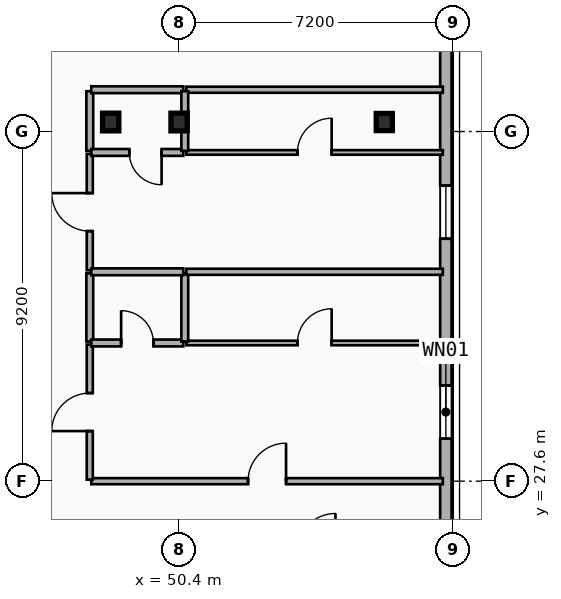
"""IFC4 building model, lengths in metres.
Left out: names, types, materials, properties, quantities, classifications, styles, units other than length and angle.
Written with IfcOpenShell. Run it as: python <this file> out.ifc"""

import sys

from ifc_helpers import new_model, si_unit, direction, frame, frame_2d, origin, origin_2d, place, context, subcontext, project, spatial, rectangle, i_section, extrude, element, fill, save


model = new_model("IFC4")
c1 = context("Model", 3, precision=1e-05, world=origin(), true_north=direction((0.0, 1.0)))
c2 = subcontext(c1, "Body", "Model", "MODEL_VIEW")
j1 = project(units=[si_unit("LENGTHUNIT", "METRE"), si_unit("PLANEANGLEUNIT", "RADIAN")], contexts=[c1])
p1 = place(None, origin())
s1 = spatial("IfcSite", under=j1, at=p1, CompositionType="ELEMENT")
p2 = place(p1, origin())
s2 = spatial("IfcBuilding", under=s1, at=p2, CompositionType="ELEMENT")
p3 = place(p2, frame((0.0, 0.0, 32.5)))
s3 = spatial("IfcBuildingStorey", under=s2, at=p3, CompositionType="ELEMENT", Elevation=32.5)
for number, where, z_axis, x_axis in (
    (1, (48.6, 37.05, 0.0), (0.0, 0.0, 1.0), (1.0, 0.0, 0.0)),
    (2, (50.4, 37.05, 0.0), (0.0, 0.0, 1.0), (1.0, 0.0, 0.0)),
):
    element("IfcColumn", number, at=place(p3, frame(where, z_axis=z_axis, x_axis=x_axis)), inside=s3, PredefinedType="COLUMN", context=c2, shape_type="SweptSolid", body=[
        extrude(i_section(OverallWidth=0.428, OverallDepth=0.465, WebThickness=0.045, FlangeThickness=0.073, FilletRadius=0.015, at=origin_2d()), origin(), (0.0, 0.0, 1.0), 3.5),
    ])
p4 = place(p3, frame((55.8, 37.05, 0.0), z_axis=(0.0, 0.0, 1.0), x_axis=(1.0, 0.0, 0.0)))
e3 = element("IfcColumn", 3, at=p4, inside=s3, PredefinedType="COLUMN", context=c2, shape_type="SweptSolid", body=[
    extrude(i_section(OverallWidth=0.424, OverallDepth=0.45, WebThickness=0.041, FlangeThickness=0.065, FilletRadius=0.015, at=origin_2d()), origin(), (0.0, 0.0, 1.0), 3.5),
])
p5 = place(p3, frame((57.42, 41.0, 0.0), z_axis=(0.0, 0.0, 1.0), x_axis=(0.0, -1.0, 0.0)))
e4 = element("IfcWall", 4, at=p5, inside=s3, PredefinedType="SOLIDWALL", context=c2, shape_type="SweptSolid", body=[
    extrude(rectangle(XDim=15.2, YDim=0.3, at=frame_2d((7.6, 0.0))), origin(), (0.0, 0.0, 1.0), 3.24),
])
p6 = place(p5, frame((10.882, 0.0, 0.48)))
e5 = element("IfcOpeningElement", 5, at=p6, cuts=e4, PredefinedType="OPENING", context=c2, shape_type="SweptSolid", body=[
    extrude(rectangle(XDim=1.4, YDim=1.8, at=frame_2d((0.7, 0.9))), frame((0.0, 0.16, 0.0), z_axis=(0.0, -1.0, 0.0), x_axis=(1.0, 0.0, 0.0)), (0.0, 0.0, 1.0), 0.32),
])
p7 = place(p5, frame((5.621, 0.0, 0.48)))
e6 = element("IfcOpeningElement", 6, at=p7, cuts=e4, PredefinedType="OPENING", context=c2, shape_type="SweptSolid", body=[
    extrude(rectangle(XDim=1.4, YDim=1.8, at=frame_2d((0.7, 0.9))), frame((0.0, 0.16, 0.0), z_axis=(0.0, -1.0, 0.0), x_axis=(1.0, 0.0, 0.0)), (0.0, 0.0, 1.0), 0.32),
])
p8 = place(p3, frame((48.09, 27.6, 0.0), z_axis=(0.0, 0.0, 1.0), x_axis=(1.0, 0.0, 0.0)))
e7 = element("IfcWall", 7, at=p8, inside=s3, PredefinedType="PARTITIONING", context=c2, shape_type="SweptSolid", body=[
    extrude(rectangle(XDim=9.25, YDim=0.16, at=frame_2d((4.625, 0.0))), origin(), (0.0, 0.0, 1.0), 2.57),
])
p9 = place(p8, frame((4.125, 0.0, 0.0)))
e8 = element("IfcOpeningElement", 8, at=p9, cuts=e7, PredefinedType="OPENING", context=c2, shape_type="SweptSolid", body=[
    extrude(rectangle(XDim=1.0, YDim=2.15, at=frame_2d((0.5, 1.075))), frame((0.0, 0.09, 0.0), z_axis=(0.0, -1.0, 0.0), x_axis=(1.0, 0.0, 0.0)), (0.0, 0.0, 1.0), 0.18),
])
p10 = place(p3, frame((48.05, 27.64, 0.0), z_axis=(0.0, 0.0, 1.0), x_axis=(0.0, 1.0, 0.0)))
e9 = element("IfcWall", 9, at=p10, inside=s3, PredefinedType="PARTITIONING", context=c2, shape_type="SweptSolid", body=[
    extrude(rectangle(XDim=3.556, YDim=0.16, at=frame_2d((1.778, 0.0))), origin(), (0.0, 0.0, 1.0), 3.24),
])
p11 = place(p10, frame((1.278, 0.0, 0.0)))
e10 = element("IfcOpeningElement", 10, at=p11, cuts=e9, PredefinedType="OPENING", context=c2, shape_type="SweptSolid", body=[
    extrude(rectangle(XDim=1.0, YDim=2.15, at=frame_2d((0.5, 1.075))), frame((0.0, 0.09, 0.0), z_axis=(0.0, -1.0, 0.0), x_axis=(1.0, 0.0, 0.0)), (0.0, 0.0, 1.0), 0.18),
])
p12 = place(p3, frame((48.05, 31.276, 0.0), z_axis=(0.0, 0.0, 1.0), x_axis=(0.0, 1.0, 0.0)))
e11 = element("IfcWall", 11, at=p12, inside=s3, PredefinedType="PLUMBINGWALL", context=c2, shape_type="SweptSolid", body=[
    extrude(rectangle(XDim=1.793, YDim=0.18, at=frame_2d((0.896, 0.0))), origin(), (0.0, 0.0, 1.0), 3.24),
])
p13 = place(p3, frame((48.05, 33.149, 0.0), z_axis=(0.0, 0.0, 1.0), x_axis=(0.0, 1.0, 0.0)))
e12 = element("IfcWall", 12, at=p13, inside=s3, PredefinedType="PARTITIONING", context=c2, shape_type="SweptSolid", body=[
    extrude(rectangle(XDim=3.061, YDim=0.16, at=frame_2d((1.531, 0.0))), origin(), (0.0, 0.0, 1.0), 3.24),
])
p14 = place(p13, frame((1.031, 0.0, 0.0)))
e13 = element("IfcOpeningElement", 13, at=p14, cuts=e12, PredefinedType="OPENING", context=c2, shape_type="SweptSolid", body=[
    extrude(rectangle(XDim=1.0, YDim=2.15, at=frame_2d((0.5, 1.075))), frame((0.0, 0.09, 0.0), z_axis=(0.0, -1.0, 0.0), x_axis=(1.0, 0.0, 0.0)), (0.0, 0.0, 1.0), 0.18),
])
p15 = place(p3, frame((48.05, 36.29, 0.0), z_axis=(0.0, 0.0, 1.0), x_axis=(0.0, 1.0, 0.0)))
e14 = element("IfcWall", 14, at=p15, inside=s3, PredefinedType="PLUMBINGWALL", context=c2, shape_type="SweptSolid", body=[
    extrude(rectangle(XDim=1.57, YDim=0.18, at=frame_2d((0.785, 0.0))), origin(), (0.0, 0.0, 1.0), 2.72),
])
p16 = place(p3, frame((48.09, 37.9, 0.0), z_axis=(0.0, 0.0, 1.0), x_axis=(1.0, 0.0, 0.0)))
e15 = element("IfcWall", 15, at=p16, inside=s3, PredefinedType="PLUMBINGWALL", context=c2, shape_type="SweptSolid", body=[
    extrude(rectangle(XDim=2.42, YDim=0.18, at=frame_2d((1.21, 0.0))), origin(), (0.0, 0.0, 1.0), 3.24),
])
p17 = place(p3, frame((50.59, 37.9, 0.0), z_axis=(0.0, 0.0, 1.0), x_axis=(1.0, 0.0, 0.0)))
e16 = element("IfcWall", 16, at=p17, inside=s3, PredefinedType="PARTITIONING", context=c2, shape_type="SweptSolid", body=[
    extrude(rectangle(XDim=6.75, YDim=0.16, at=frame_2d((3.375, 0.0))), origin(), (0.0, 0.0, 1.0), 3.24),
])
p18 = place(p3, frame((48.09, 31.236, 0.0), z_axis=(0.0, 0.0, 1.0), x_axis=(1.0, 0.0, 0.0)))
e17 = element("IfcWall", 17, at=p18, inside=s3, PredefinedType="PLUMBINGWALL", context=c2, shape_type="SweptSolid", body=[
    extrude(rectangle(XDim=2.42, YDim=0.18, at=frame_2d((1.21, 0.0))), origin(), (0.0, 0.0, 1.0), 2.57),
])
p19 = place(p18, frame((0.785, 0.0, 0.0)))
e18 = element("IfcOpeningElement", 18, at=p19, cuts=e17, PredefinedType="OPENING", context=c2, shape_type="SweptSolid", body=[
    extrude(rectangle(XDim=0.85, YDim=2.1, at=frame_2d((0.425, 1.05))), frame((0.0, 0.1, 0.0), z_axis=(0.0, -1.0, 0.0), x_axis=(1.0, 0.0, 0.0)), (0.0, 0.0, 1.0), 0.2),
])
p20 = place(p3, frame((50.59, 31.236, 0.0), z_axis=(0.0, 0.0, 1.0), x_axis=(1.0, 0.0, 0.0)))
e19 = element("IfcWall", 19, at=p20, inside=s3, PredefinedType="PARTITIONING", context=c2, shape_type="SweptSolid", body=[
    extrude(rectangle(XDim=6.75, YDim=0.12, at=frame_2d((3.375, 0.0))), origin(), (0.0, 0.0, 1.0), 2.57),
])
p21 = place(p20, frame((2.925, 0.0, 0.0)))
e20 = element("IfcOpeningElement", 20, at=p21, cuts=e19, PredefinedType="OPENING", context=c2, shape_type="SweptSolid", body=[
    extrude(rectangle(XDim=0.9, YDim=2.1, at=frame_2d((0.45, 1.05))), frame((0.0, 0.07, 0.0), z_axis=(0.0, -1.0, 0.0), x_axis=(1.0, 0.0, 0.0)), (0.0, 0.0, 1.0), 0.14),
])
p22 = place(p3, frame((50.55, 31.276, 0.0), z_axis=(0.0, 0.0, 1.0), x_axis=(0.0, 1.0, 0.0)))
e21 = element("IfcWall", 21, at=p22, inside=s3, PredefinedType="PLUMBINGWALL", context=c2, shape_type="SweptSolid", body=[
    extrude(rectangle(XDim=1.793, YDim=0.18, at=frame_2d((0.896, 0.0))), origin(), (0.0, 0.0, 1.0), 2.57),
])
p23 = place(p3, frame((48.09, 33.109, 0.0), z_axis=(0.0, 0.0, 1.0), x_axis=(1.0, 0.0, 0.0)))
e22 = element("IfcWall", 22, at=p23, inside=s3, PredefinedType="PLUMBINGWALL", context=c2, shape_type="SweptSolid", body=[
    extrude(rectangle(XDim=2.42, YDim=0.18, at=frame_2d((1.21, 0.0))), origin(), (0.0, 0.0, 1.0), 2.57),
])
p24 = place(p3, frame((50.59, 33.109, 0.0), z_axis=(0.0, 0.0, 1.0), x_axis=(1.0, 0.0, 0.0)))
e23 = element("IfcWall", 23, at=p24, inside=s3, PredefinedType="PARTITIONING", context=c2, shape_type="SweptSolid", body=[
    extrude(rectangle(XDim=6.75, YDim=0.16, at=frame_2d((3.375, 0.0))), origin(), (0.0, 0.0, 1.0), 2.57),
])
p25 = place(p3, frame((50.51, 36.25, 0.0), z_axis=(0.0, 0.0, 1.0), x_axis=(-1.0, 0.0, 0.0)))
e24 = element("IfcWall", 24, at=p25, inside=s3, PredefinedType="PLUMBINGWALL", context=c2, shape_type="SweptSolid", body=[
    extrude(rectangle(XDim=2.42, YDim=0.18, at=frame_2d((1.21, 0.0))), origin(), (0.0, 0.0, 1.0), 2.57),
])
p26 = place(p25, frame((0.57, 0.0, 0.0)))
e25 = element("IfcOpeningElement", 25, at=p26, cuts=e24, PredefinedType="OPENING", context=c2, shape_type="SweptSolid", body=[
    extrude(rectangle(XDim=0.85, YDim=2.1, at=frame_2d((0.425, 1.05))), frame((0.0, 0.1, 0.0), z_axis=(0.0, -1.0, 0.0), x_axis=(1.0, 0.0, 0.0)), (0.0, 0.0, 1.0), 0.2),
])
p27 = place(p3, frame((50.59, 36.25, 0.0), z_axis=(0.0, 0.0, 1.0), x_axis=(1.0, 0.0, 0.0)))
e26 = element("IfcWall", 26, at=p27, inside=s3, PredefinedType="PARTITIONING", context=c2, shape_type="SweptSolid", body=[
    extrude(rectangle(XDim=6.75, YDim=0.12, at=frame_2d((3.375, 0.0))), origin(), (0.0, 0.0, 1.0), 2.57),
])
p28 = place(p27, frame((2.925, 0.0, 0.0)))
e27 = element("IfcOpeningElement", 27, at=p28, cuts=e26, PredefinedType="OPENING", context=c2, shape_type="SweptSolid", body=[
    extrude(rectangle(XDim=0.9, YDim=2.1, at=frame_2d((0.45, 1.05))), frame((0.0, 0.07, 0.0), z_axis=(0.0, -1.0, 0.0), x_axis=(1.0, 0.0, 0.0)), (0.0, 0.0, 1.0), 0.14),
])
p29 = place(p3, frame((50.55, 36.29, 0.0), z_axis=(0.0, 0.0, 1.0), x_axis=(0.0, 1.0, 0.0)))
e28 = element("IfcWall", 28, at=p29, inside=s3, PredefinedType="PLUMBINGWALL", context=c2, shape_type="SweptSolid", body=[
    extrude(rectangle(XDim=1.57, YDim=0.18, at=frame_2d((0.785, 0.0))), origin(), (0.0, 0.0, 1.0), 2.57),
])
p30 = place(p6, origin())
e29 = element("IfcWindow", 29, at=p30, inside=s3, PartitioningType="SINGLE_PANEL", PredefinedType="WINDOW", context=c2, shape_type="SweptSolid", body=[
    extrude(rectangle(XDim=1.4, YDim=1.8, at=frame_2d((0.7, 0.9))), frame((0.0, 0.03, 0.0), z_axis=(0.0, -1.0, 0.0), x_axis=(1.0, 0.0, 0.0)), (0.0, 0.0, 1.0), 0.06),
])
fill(e5, e29)
p31 = place(p7, origin())
e30 = element("IfcWindow", 30, at=p31, inside=s3, PartitioningType="SINGLE_PANEL", PredefinedType="WINDOW", context=c2, shape_type="SweptSolid", body=[
    extrude(rectangle(XDim=1.4, YDim=1.8, at=frame_2d((0.7, 0.9))), frame((0.0, 0.03, 0.0), z_axis=(0.0, -1.0, 0.0), x_axis=(1.0, 0.0, 0.0)), (0.0, 0.0, 1.0), 0.06),
])
fill(e6, e30)
p32 = place(p9, origin())
e31 = element("IfcDoor", 31, at=p32, inside=s3, OperationType="SINGLE_SWING_RIGHT", PredefinedType="DOOR", context=c2, shape_type="SweptSolid", body=[
    extrude(rectangle(XDim=1.0, YDim=2.15, at=frame_2d((0.5, 1.075))), frame((0.0, 0.025, 0.0), z_axis=(0.0, -1.0, 0.0), x_axis=(1.0, 0.0, 0.0)), (0.0, 0.0, 1.0), 0.05),
])
fill(e8, e31)
p33 = place(p11, origin())
e32 = element("IfcDoor", 32, at=p33, inside=s3, OperationType="SINGLE_SWING_LEFT", PredefinedType="DOOR", context=c2, shape_type="SweptSolid", body=[
    extrude(rectangle(XDim=1.0, YDim=2.15, at=frame_2d((0.5, 1.075))), frame((0.0, 0.025, 0.0), z_axis=(0.0, -1.0, 0.0), x_axis=(1.0, 0.0, 0.0)), (0.0, 0.0, 1.0), 0.05),
])
fill(e10, e32)
p34 = place(p14, origin())
e33 = element("IfcDoor", 33, at=p34, inside=s3, OperationType="SINGLE_SWING_RIGHT", PredefinedType="DOOR", context=c2, shape_type="SweptSolid", body=[
    extrude(rectangle(XDim=1.0, YDim=2.15, at=frame_2d((0.5, 1.075))), frame((0.0, 0.025, 0.0), z_axis=(0.0, -1.0, 0.0), x_axis=(1.0, 0.0, 0.0)), (0.0, 0.0, 1.0), 0.05),
])
fill(e13, e33)
p35 = place(p19, origin())
e34 = element("IfcDoor", 34, at=p35, inside=s3, OperationType="SINGLE_SWING_LEFT", PredefinedType="DOOR", context=c2, shape_type="SweptSolid", body=[
    extrude(rectangle(XDim=0.85, YDim=2.1, at=frame_2d((0.425, 1.05))), frame((0.0, 0.025, 0.0), z_axis=(0.0, -1.0, 0.0), x_axis=(1.0, 0.0, 0.0)), (0.0, 0.0, 1.0), 0.05),
])
fill(e18, e34)
p36 = place(p21, origin())
e35 = element("IfcDoor", 35, at=p36, inside=s3, OperationType="SINGLE_SWING_RIGHT", PredefinedType="DOOR", context=c2, shape_type="SweptSolid", body=[
    extrude(rectangle(XDim=0.9, YDim=2.1, at=frame_2d((0.45, 1.05))), frame((0.0, 0.025, 0.0), z_axis=(0.0, -1.0, 0.0), x_axis=(1.0, 0.0, 0.0)), (0.0, 0.0, 1.0), 0.05),
])
fill(e20, e35)
p37 = place(p26, origin())
e36 = element("IfcDoor", 36, at=p37, inside=s3, OperationType="SINGLE_SWING_LEFT", PredefinedType="DOOR", context=c2, shape_type="SweptSolid", body=[
    extrude(rectangle(XDim=0.85, YDim=2.1, at=frame_2d((0.425, 1.05))), frame((0.0, 0.025, 0.0), z_axis=(0.0, -1.0, 0.0), x_axis=(1.0, 0.0, 0.0)), (0.0, 0.0, 1.0), 0.05),
])
fill(e25, e36)
p38 = place(p28, origin())
e37 = element("IfcDoor", 37, at=p38, inside=s3, OperationType="SINGLE_SWING_RIGHT", PredefinedType="DOOR", context=c2, shape_type="SweptSolid", body=[
    extrude(rectangle(XDim=0.9, YDim=2.1, at=frame_2d((0.45, 1.05))), frame((0.0, 0.025, 0.0), z_axis=(0.0, -1.0, 0.0), x_axis=(1.0, 0.0, 0.0)), (0.0, 0.0, 1.0), 0.05),
])
fill(e27, e37)
save(model, sys.argv[1])
